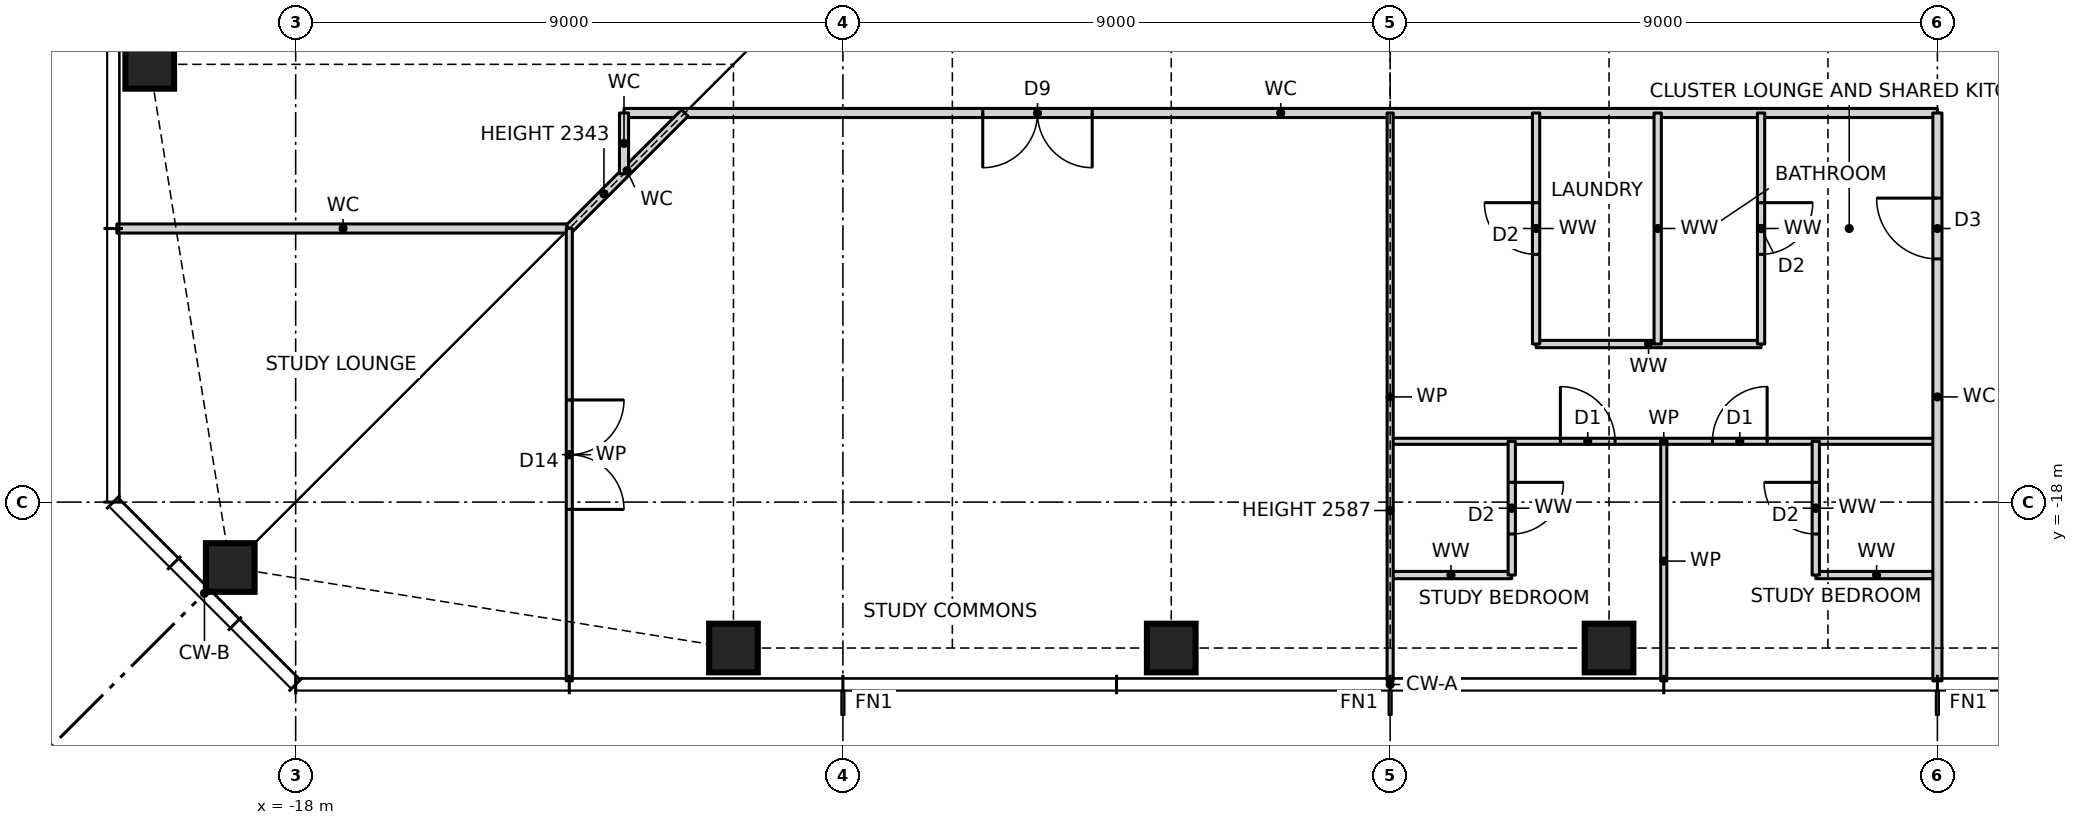
"""IFC4 building model, lengths in metres.
Left out: names, types, materials, properties, quantities, classifications, styles, units other than length and angle.
Written with IfcOpenShell. Run it as: python <this file> out.ifc"""

import sys

from ifc_helpers import new_model, si_unit, direction, frame, frame_2d, origin, origin_2d, place, context, subcontext, project, spatial, rectangle, hollow_rectangle, extrude, element, fill, save


model = new_model("IFC4")
c1 = context("Model", 3, precision=1e-05, world=origin(), true_north=direction((0.0, 1.0)))
c2 = subcontext(c1, "Body", "Model", "MODEL_VIEW")
j1 = project(units=[si_unit("LENGTHUNIT", "METRE"), si_unit("PLANEANGLEUNIT", "RADIAN")], contexts=[c1])
p1 = place(None, origin())
s1 = spatial("IfcSite", under=j1, at=p1, CompositionType="ELEMENT")
p2 = place(p1, origin())
s2 = spatial("IfcBuilding", under=s1, at=p2, CompositionType="ELEMENT")
p3 = place(p2, frame((0.0, 0.0, 126.0)))
s3 = spatial("IfcBuildingStorey", under=s2, at=p3, CompositionType="ELEMENT", Elevation=126.0)
for number, where, z_axis, x_axis in (
    (1, (-19.076, -19.076, 0.0), (0.0, 0.0, 1.0), (1.0, 0.0, 0.0)),
    (2, (-10.8, -20.4, 0.0), (0.0, 0.0, 1.0), (1.0, 0.0, 0.0)),
    (3, (-3.6, -20.4, 0.0), (0.0, 0.0, 1.0), (1.0, 0.0, 0.0)),
    (4, (3.6, -20.4, 0.0), (0.0, 0.0, 1.0), (1.0, 0.0, 0.0)),
    (5, (-20.4, -10.8, 0.0), (0.0, 0.0, 1.0), (1.0, 0.0, 0.0)),
):
    element("IfcColumn", number, at=place(p3, frame(where, z_axis=z_axis, x_axis=x_axis)), inside=s3, PredefinedType="COLUMN", context=c2, shape_type="SweptSolid", body=[
        extrude(hollow_rectangle(XDim=0.8, YDim=0.8, WallThickness=0.07, at=origin_2d()), origin(), (0.0, 0.0, 1.0), 3.5),
    ])
for number, where, z_axis, x_axis in (
    (6, (0.0, -19.2, 0.0), (0.0, 0.0, 1.0), (1.0, 0.0, 0.0)),
    (7, (7.0, -19.2, 0.0), (0.0, 0.0, 1.0), (1.0, 0.0, 0.0)),
):
    element("IfcWall", number, at=place(p3, frame(where, z_axis=z_axis, x_axis=x_axis)), inside=s3, PredefinedType="PARTITIONING", context=c2, shape_type="SweptSolid", body=[
        extrude(rectangle(XDim=2.0, YDim=0.12, at=frame_2d((1.0, 0.0))), origin(), (0.0, 0.0, 1.0), 3.27),
    ])
p4 = place(p3, frame((0.0, -17.0, 0.0), z_axis=(0.0, 0.0, 1.0), x_axis=(1.0, 0.0, 0.0)))
e8 = element("IfcWall", 8, at=p4, inside=s3, PredefinedType="PARTITIONING", context=c2, shape_type="SweptSolid", body=[
    extrude(rectangle(XDim=9.0, YDim=0.1, at=frame_2d((4.5, 0.0))), origin(), (0.0, 0.0, 1.0), 3.27),
])
p5 = place(p4, frame((2.8, 0.0, 0.0)))
e9 = element("IfcOpeningElement", 9, at=p5, cuts=e8, PredefinedType="OPENING", context=c2, shape_type="SweptSolid", body=[
    extrude(rectangle(XDim=0.9, YDim=2.1, at=frame_2d((0.45, 1.05))), frame((0.0, 0.06, 0.0), z_axis=(0.0, -1.0, 0.0), x_axis=(1.0, 0.0, 0.0)), (0.0, 0.0, 1.0), 0.12),
])
p6 = place(p4, frame((5.3, 0.0, 0.0)))
e10 = element("IfcOpeningElement", 10, at=p6, cuts=e8, PredefinedType="OPENING", context=c2, shape_type="SweptSolid", body=[
    extrude(rectangle(XDim=0.9, YDim=2.1, at=frame_2d((0.45, 1.05))), frame((0.0, 0.06, 0.0), z_axis=(0.0, -1.0, 0.0), x_axis=(1.0, 0.0, 0.0)), (0.0, 0.0, 1.0), 0.12),
])
p7 = place(p3, frame((2.4, -15.4, 0.0), z_axis=(0.0, 0.0, 1.0), x_axis=(1.0, 0.0, 0.0)))
e11 = element("IfcWall", 11, at=p7, inside=s3, PredefinedType="PARTITIONING", context=c2, shape_type="SweptSolid", body=[
    extrude(rectangle(XDim=3.7, YDim=0.12, at=frame_2d((1.85, 0.0))), origin(), (0.0, 0.0, 1.0), 3.27),
])
p8 = place(p3, frame((-20.94, -13.5, 0.0), z_axis=(0.0, 0.0, 1.0), x_axis=(1.0, 0.0, 0.0)))
e12 = element("IfcWall", 12, at=p8, inside=s3, PredefinedType="PARTITIONING", context=c2, shape_type="SweptSolid", body=[
    extrude(rectangle(XDim=7.44, YDim=0.15, at=frame_2d((3.72, 0.0))), origin(), (0.0, 0.0, 1.0), 3.27),
])
p9 = place(p3, frame((-12.6, -11.6, 0.0), z_axis=(0.0, 0.0, 1.0), x_axis=(1.0, 0.0, 0.0)))
e13 = element("IfcWall", 13, at=p9, inside=s3, PredefinedType="PARTITIONING", context=c2, shape_type="SweptSolid", body=[
    extrude(rectangle(XDim=21.6, YDim=0.15, at=frame_2d((10.8, 0.0))), origin(), (0.0, 0.0, 1.0), 3.27),
])
p10 = place(p9, frame((5.9, 0.0, 0.0)))
e14 = element("IfcOpeningElement", 14, at=p10, cuts=e13, PredefinedType="OPENING", context=c2, shape_type="SweptSolid", body=[
    extrude(rectangle(XDim=1.8, YDim=2.1, at=frame_2d((0.9, 1.05))), frame((0.0, 0.085, 0.0), z_axis=(0.0, -1.0, 0.0), x_axis=(1.0, 0.0, 0.0)), (0.0, 0.0, 1.0), 0.17),
])
p11 = place(p3, frame((-13.5, -13.5, 0.0), z_axis=(0.0, 0.0, 1.0), x_axis=(0.707106781187, 0.707106781187, 0.0)))
e15 = element("IfcWall", 15, at=p11, inside=s3, PredefinedType="PARTITIONING", context=c2, shape_type="SweptSolid", body=[
    extrude(rectangle(XDim=2.687, YDim=0.15, at=frame_2d((1.343, 0.0))), origin(), (0.0, 0.0, 1.0), 2.343),
])
p12 = place(p3, frame((9.0, -20.94, 0.0), z_axis=(0.0, 0.0, 1.0), x_axis=(0.0, 1.0, 0.0)))
e16 = element("IfcWall", 16, at=p12, inside=s3, PredefinedType="PARTITIONING", context=c2, shape_type="SweptSolid", body=[
    extrude(rectangle(XDim=9.34, YDim=0.15, at=frame_2d((4.67, 0.0))), origin(), (0.0, 0.0, 1.0), 3.27),
])
p13 = place(p12, frame((6.94, 0.0, 0.0)))
e17 = element("IfcOpeningElement", 17, at=p13, cuts=e16, PredefinedType="OPENING", context=c2, shape_type="SweptSolid", body=[
    extrude(rectangle(XDim=1.0, YDim=2.1, at=frame_2d((0.5, 1.05))), frame((0.0, 0.085, 0.0), z_axis=(0.0, -1.0, 0.0), x_axis=(1.0, 0.0, 0.0)), (0.0, 0.0, 1.0), 0.17),
])
p14 = place(p3, frame((7.0, -19.2, 0.0), z_axis=(0.0, 0.0, 1.0), x_axis=(0.0, 1.0, 0.0)))
e18 = element("IfcWall", 18, at=p14, inside=s3, PredefinedType="PARTITIONING", context=c2, shape_type="SweptSolid", body=[
    extrude(rectangle(XDim=2.2, YDim=0.12, at=frame_2d((1.1, 0.0))), origin(), (0.0, 0.0, 1.0), 3.27),
])
p15 = place(p14, frame((0.675, 0.0, 0.0)))
e19 = element("IfcOpeningElement", 19, at=p15, cuts=e18, PredefinedType="OPENING", context=c2, shape_type="SweptSolid", body=[
    extrude(rectangle(XDim=0.85, YDim=2.1, at=frame_2d((0.425, 1.05))), frame((0.0, 0.07, 0.0), z_axis=(0.0, -1.0, 0.0), x_axis=(1.0, 0.0, 0.0)), (0.0, 0.0, 1.0), 0.14),
])
p16 = place(p3, frame((6.1, -15.4, 0.0), z_axis=(0.0, 0.0, 1.0), x_axis=(0.0, 1.0, 0.0)))
e20 = element("IfcWall", 20, at=p16, inside=s3, PredefinedType="PARTITIONING", context=c2, shape_type="SweptSolid", body=[
    extrude(rectangle(XDim=3.8, YDim=0.12, at=frame_2d((1.9, 0.0))), origin(), (0.0, 0.0, 1.0), 3.27),
])
p17 = place(p16, frame((1.475, 0.0, 0.0)))
e21 = element("IfcOpeningElement", 21, at=p17, cuts=e20, PredefinedType="OPENING", context=c2, shape_type="SweptSolid", body=[
    extrude(rectangle(XDim=0.85, YDim=2.1, at=frame_2d((0.425, 1.05))), frame((0.0, 0.07, 0.0), z_axis=(0.0, -1.0, 0.0), x_axis=(1.0, 0.0, 0.0)), (0.0, 0.0, 1.0), 0.14),
])
p18 = place(p3, frame((4.5, -20.94, 0.0), z_axis=(0.0, 0.0, 1.0), x_axis=(0.0, 1.0, 0.0)))
e22 = element("IfcWall", 22, at=p18, inside=s3, PredefinedType="PARTITIONING", context=c2, shape_type="SweptSolid", body=[
    extrude(rectangle(XDim=3.94, YDim=0.1, at=frame_2d((1.97, 0.0))), origin(), (0.0, 0.0, 1.0), 3.27),
])
p19 = place(p3, frame((4.4, -15.4, 0.0), z_axis=(0.0, 0.0, 1.0), x_axis=(0.0, 1.0, 0.0)))
e23 = element("IfcWall", 23, at=p19, inside=s3, PredefinedType="PARTITIONING", context=c2, shape_type="SweptSolid", body=[
    extrude(rectangle(XDim=3.8, YDim=0.12, at=frame_2d((1.9, 0.0))), origin(), (0.0, 0.0, 1.0), 3.27),
])
p20 = place(p3, frame((2.4, -15.4, 0.0), z_axis=(0.0, 0.0, 1.0), x_axis=(0.0, 1.0, 0.0)))
e24 = element("IfcWall", 24, at=p20, inside=s3, PredefinedType="PARTITIONING", context=c2, shape_type="SweptSolid", body=[
    extrude(rectangle(XDim=3.8, YDim=0.12, at=frame_2d((1.9, 0.0))), origin(), (0.0, 0.0, 1.0), 3.27),
])
p21 = place(p20, frame((1.475, 0.0, 0.0)))
e25 = element("IfcOpeningElement", 25, at=p21, cuts=e24, PredefinedType="OPENING", context=c2, shape_type="SweptSolid", body=[
    extrude(rectangle(XDim=0.85, YDim=2.1, at=frame_2d((0.425, 1.05))), frame((0.0, 0.07, 0.0), z_axis=(0.0, -1.0, 0.0), x_axis=(1.0, 0.0, 0.0)), (0.0, 0.0, 1.0), 0.14),
])
p22 = place(p3, frame((2.0, -19.2, 0.0), z_axis=(0.0, 0.0, 1.0), x_axis=(0.0, 1.0, 0.0)))
e26 = element("IfcWall", 26, at=p22, inside=s3, PredefinedType="PARTITIONING", context=c2, shape_type="SweptSolid", body=[
    extrude(rectangle(XDim=2.2, YDim=0.12, at=frame_2d((1.1, 0.0))), origin(), (0.0, 0.0, 1.0), 3.27),
])
p23 = place(p22, frame((0.675, 0.0, 0.0)))
e27 = element("IfcOpeningElement", 27, at=p23, cuts=e26, PredefinedType="OPENING", context=c2, shape_type="SweptSolid", body=[
    extrude(rectangle(XDim=0.85, YDim=2.1, at=frame_2d((0.425, 1.05))), frame((0.0, 0.07, 0.0), z_axis=(0.0, -1.0, 0.0), x_axis=(1.0, 0.0, 0.0)), (0.0, 0.0, 1.0), 0.14),
])
p24 = place(p3, frame((0.0, -20.94, 0.0), z_axis=(0.0, 0.0, 1.0), x_axis=(0.0, 1.0, 0.0)))
e28 = element("IfcWall", 28, at=p24, inside=s3, PredefinedType="PARTITIONING", context=c2, shape_type="SweptSolid", body=[
    extrude(rectangle(XDim=9.34, YDim=0.1, at=frame_2d((4.67, 0.0))), origin(), (0.0, 0.0, 1.0), 2.587),
])
p25 = place(p3, frame((-12.6, -12.6, 0.0), z_axis=(0.0, 0.0, 1.0), x_axis=(0.0, 1.0, 0.0)))
e29 = element("IfcWall", 29, at=p25, inside=s3, PredefinedType="PARTITIONING", context=c2, shape_type="SweptSolid", body=[
    extrude(rectangle(XDim=1.0, YDim=0.15, at=frame_2d((0.5, 0.0))), origin(), (0.0, 0.0, 1.0), 3.27),
])
p26 = place(p3, frame((-13.5, -20.94, 0.0), z_axis=(0.0, 0.0, 1.0), x_axis=(0.0, 1.0, 0.0)))
e30 = element("IfcWall", 30, at=p26, inside=s3, PredefinedType="PARTITIONING", context=c2, shape_type="SweptSolid", body=[
    extrude(rectangle(XDim=7.44, YDim=0.1, at=frame_2d((3.72, 0.0))), origin(), (0.0, 0.0, 1.0), 3.27),
])
p27 = place(p26, frame((2.82, 0.0, 0.0)))
e31 = element("IfcOpeningElement", 31, at=p27, cuts=e30, PredefinedType="OPENING", context=c2, shape_type="SweptSolid", body=[
    extrude(rectangle(XDim=1.8, YDim=2.1, at=frame_2d((0.9, 1.05))), frame((0.0, 0.06, 0.0), z_axis=(0.0, -1.0, 0.0), x_axis=(1.0, 0.0, 0.0)), (0.0, 0.0, 1.0), 0.12),
])
p28 = place(p10, frame((1.8, 0.0, 0.0), z_axis=(0.0, 0.0, 1.0), x_axis=(-1.0, 0.0, 0.0)))
e32 = element("IfcDoor", 32, at=p28, inside=s3, OperationType="DOUBLE_DOOR_SINGLE_SWING", PredefinedType="DOOR", context=c2, shape_type="SweptSolid", body=[
    extrude(rectangle(XDim=1.8, YDim=2.1, at=frame_2d((0.9, 1.05))), frame((0.0, 0.025, 0.0), z_axis=(0.0, -1.0, 0.0), x_axis=(1.0, 0.0, 0.0)), (0.0, 0.0, 1.0), 0.05),
])
fill(e14, e32)
p29 = place(p23, frame((0.85, 0.0, 0.0), z_axis=(0.0, 0.0, 1.0), x_axis=(-1.0, 0.0, 0.0)))
e33 = element("IfcDoor", 33, at=p29, inside=s3, OperationType="SINGLE_SWING_LEFT", PredefinedType="DOOR", context=c2, shape_type="SweptSolid", body=[
    extrude(rectangle(XDim=0.85, YDim=2.1, at=frame_2d((0.425, 1.05))), frame((0.0, 0.025, 0.0), z_axis=(0.0, -1.0, 0.0), x_axis=(1.0, 0.0, 0.0)), (0.0, 0.0, 1.0), 0.05),
])
fill(e27, e33)
p30 = place(p5, origin())
e34 = element("IfcDoor", 34, at=p30, inside=s3, OperationType="SINGLE_SWING_LEFT", PredefinedType="DOOR", context=c2, shape_type="SweptSolid", body=[
    extrude(rectangle(XDim=0.9, YDim=2.1, at=frame_2d((0.45, 1.05))), frame((0.0, 0.025, 0.0), z_axis=(0.0, -1.0, 0.0), x_axis=(1.0, 0.0, 0.0)), (0.0, 0.0, 1.0), 0.05),
])
fill(e9, e34)
p31 = place(p15, origin())
e35 = element("IfcDoor", 35, at=p31, inside=s3, OperationType="SINGLE_SWING_RIGHT", PredefinedType="DOOR", context=c2, shape_type="SweptSolid", body=[
    extrude(rectangle(XDim=0.85, YDim=2.1, at=frame_2d((0.425, 1.05))), frame((0.0, 0.025, 0.0), z_axis=(0.0, -1.0, 0.0), x_axis=(1.0, 0.0, 0.0)), (0.0, 0.0, 1.0), 0.05),
])
fill(e19, e35)
p32 = place(p6, origin())
e36 = element("IfcDoor", 36, at=p32, inside=s3, OperationType="SINGLE_SWING_RIGHT", PredefinedType="DOOR", context=c2, shape_type="SweptSolid", body=[
    extrude(rectangle(XDim=0.9, YDim=2.1, at=frame_2d((0.45, 1.05))), frame((0.0, 0.025, 0.0), z_axis=(0.0, -1.0, 0.0), x_axis=(1.0, 0.0, 0.0)), (0.0, 0.0, 1.0), 0.05),
])
fill(e10, e36)
p33 = place(p13, origin())
e37 = element("IfcDoor", 37, at=p33, inside=s3, OperationType="SINGLE_SWING_RIGHT", PredefinedType="DOOR", context=c2, shape_type="SweptSolid", body=[
    extrude(rectangle(XDim=1.0, YDim=2.1, at=frame_2d((0.5, 1.05))), frame((0.0, 0.025, 0.0), z_axis=(0.0, -1.0, 0.0), x_axis=(1.0, 0.0, 0.0)), (0.0, 0.0, 1.0), 0.05),
])
fill(e17, e37)
p34 = place(p21, origin())
e38 = element("IfcDoor", 38, at=p34, inside=s3, OperationType="SINGLE_SWING_RIGHT", PredefinedType="DOOR", context=c2, shape_type="SweptSolid", body=[
    extrude(rectangle(XDim=0.85, YDim=2.1, at=frame_2d((0.425, 1.05))), frame((0.0, 0.025, 0.0), z_axis=(0.0, -1.0, 0.0), x_axis=(1.0, 0.0, 0.0)), (0.0, 0.0, 1.0), 0.05),
])
fill(e25, e38)
p35 = place(p17, frame((0.85, 0.0, 0.0), z_axis=(0.0, 0.0, 1.0), x_axis=(-1.0, 0.0, 0.0)))
e39 = element("IfcDoor", 39, at=p35, inside=s3, OperationType="SINGLE_SWING_LEFT", PredefinedType="DOOR", context=c2, shape_type="SweptSolid", body=[
    extrude(rectangle(XDim=0.85, YDim=2.1, at=frame_2d((0.425, 1.05))), frame((0.0, 0.025, 0.0), z_axis=(0.0, -1.0, 0.0), x_axis=(1.0, 0.0, 0.0)), (0.0, 0.0, 1.0), 0.05),
])
fill(e21, e39)
p36 = place(p27, frame((1.8, 0.0, 0.0), z_axis=(0.0, 0.0, 1.0), x_axis=(-1.0, 0.0, 0.0)))
e40 = element("IfcDoor", 40, at=p36, inside=s3, OperationType="DOUBLE_DOOR_SINGLE_SWING", PredefinedType="DOOR", context=c2, shape_type="SweptSolid", body=[
    extrude(rectangle(XDim=1.8, YDim=2.1, at=frame_2d((0.9, 1.05))), frame((0.0, 0.025, 0.0), z_axis=(0.0, -1.0, 0.0), x_axis=(1.0, 0.0, 0.0)), (0.0, 0.0, 1.0), 0.05),
])
fill(e31, e40)
save(model, sys.argv[1])
